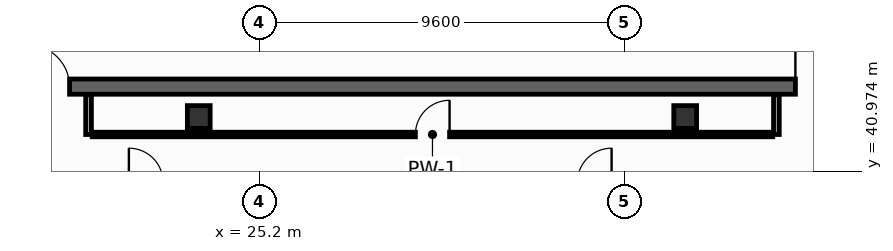
"""IFC4 building model, lengths in metres.
Left out: names, types, materials, properties, quantities, classifications, styles, units other than length and angle.
Written with IfcOpenShell. Run it as: python <this file> out.ifc"""

import sys

from ifc_helpers import new_model, si_unit, direction, frame, frame_2d, origin, origin_2d, place, context, subcontext, project, spatial, rectangle, hollow_rectangle, extrude, element, fill, save


model = new_model("IFC4")
c1 = context("Model", 3, precision=1e-05, world=origin(), true_north=direction((0.0, 1.0)))
c2 = subcontext(c1, "Body", "Model", "MODEL_VIEW")
j1 = project(units=[si_unit("LENGTHUNIT", "METRE"), si_unit("PLANEANGLEUNIT", "RADIAN")], contexts=[c1])
p1 = place(None, origin())
s1 = spatial("IfcSite", under=j1, at=p1, CompositionType="ELEMENT")
p2 = place(p1, origin())
s2 = spatial("IfcBuilding", under=s1, at=p2, CompositionType="ELEMENT")
p3 = place(p2, frame((0.0, 0.0, 302.8)))
s3 = spatial("IfcBuildingStorey", under=s2, at=p3, CompositionType="ELEMENT", Elevation=302.8)
p4 = place(p3, frame((13.7, 43.2, 0.0), z_axis=(0.0, 0.0, 1.0), x_axis=(1.0, 0.0, 0.0)))
e1 = element("IfcWall", 1, at=p4, inside=s3, PredefinedType="SHEAR", context=c2, shape_type="SweptSolid", body=[
    extrude(rectangle(XDim=32.5, YDim=0.4, at=frame_2d((16.25, 0.0))), origin(), (0.0, 0.0, 1.0), 3.55),
])
p5 = place(p4, frame((5.4, 0.0, 0.0)))
e2 = element("IfcOpeningElement", 2, at=p5, cuts=e1, PredefinedType="OPENING", context=c2, shape_type="SweptSolid", body=[
    extrude(rectangle(XDim=1.1, YDim=2.15, at=frame_2d((0.55, 1.075))), frame((0.0, 0.21, 0.0), z_axis=(0.0, -1.0, 0.0), x_axis=(1.0, 0.0, 0.0)), (0.0, 0.0, 1.0), 0.42),
])
p6 = place(p4, frame((25.6, 0.0, 0.0)))
e3 = element("IfcOpeningElement", 3, at=p6, cuts=e1, PredefinedType="OPENING", context=c2, shape_type="SweptSolid", body=[
    extrude(rectangle(XDim=1.1, YDim=2.15, at=frame_2d((0.55, 1.075))), frame((0.0, 0.21, 0.0), z_axis=(0.0, -1.0, 0.0), x_axis=(1.0, 0.0, 0.0)), (0.0, 0.0, 1.0), 0.42),
])
for number, where, z_axis, x_axis in (
    (4, (23.6, 42.4, 0.0), (0.0, 0.0, 1.0), (1.0, 0.0, 0.0)),
    (5, (36.4, 42.4, 0.0), (0.0, 0.0, 1.0), (1.0, 0.0, 0.0)),
):
    element("IfcColumn", number, at=place(p3, frame(where, z_axis=z_axis, x_axis=x_axis)), inside=s3, PredefinedType="COLUMN", context=c2, shape_type="SweptSolid", body=[
        extrude(hollow_rectangle(XDim=0.6, YDim=0.6, WallThickness=0.028, at=origin_2d()), origin(), (0.0, 0.0, 1.0), 3.8),
    ])
for number, where, z_axis, x_axis in (
    (6, (20.7, 41.94, 0.0), (0.0, 0.0, 1.0), (0.0, 1.0, 0.0)),
    (7, (38.8, 41.94, 0.0), (0.0, 0.0, 1.0), (0.0, 1.0, 0.0)),
):
    element("IfcWall", number, at=place(p3, frame(where, z_axis=z_axis, x_axis=x_axis)), inside=s3, PredefinedType="PARTITIONING", context=c2, shape_type="SweptSolid", body=[
        extrude(rectangle(XDim=1.04, YDim=0.15, at=frame_2d((0.52, 0.0))), origin(), (0.0, 0.0, 1.0), 3.55),
    ])
p7 = place(p3, frame((20.795, 41.94, 0.0), z_axis=(0.0, 0.0, 1.0), x_axis=(1.0, 0.0, 0.0)))
e8 = element("IfcWall", 8, at=p7, inside=s3, PredefinedType="PARTITIONING", context=c2, shape_type="SweptSolid", body=[
    extrude(rectangle(XDim=17.91, YDim=0.12, at=frame_2d((8.955, 0.0))), origin(), (0.0, 0.0, 1.0), 3.047),
])
p8 = place(p7, frame((8.505, 0.0, 0.0)))
e9 = element("IfcOpeningElement", 9, at=p8, cuts=e8, PredefinedType="OPENING", context=c2, shape_type="SweptSolid", body=[
    extrude(rectangle(XDim=0.9, YDim=2.1, at=frame_2d((0.45, 1.05))), frame((0.0, 0.07, 0.0), z_axis=(0.0, -1.0, 0.0), x_axis=(1.0, 0.0, 0.0)), (0.0, 0.0, 1.0), 0.14),
])
p9 = place(p5, origin())
e10 = element("IfcDoor", 10, at=p9, inside=s3, OperationType="SINGLE_SWING_LEFT", PredefinedType="DOOR", context=c2, shape_type="SweptSolid", body=[
    extrude(rectangle(XDim=1.1, YDim=2.15, at=frame_2d((0.55, 1.075))), frame((0.0, 0.025, 0.0), z_axis=(0.0, -1.0, 0.0), x_axis=(1.0, 0.0, 0.0)), (0.0, 0.0, 1.0), 0.05),
])
fill(e2, e10)
p10 = place(p6, origin())
e11 = element("IfcDoor", 11, at=p10, inside=s3, OperationType="SINGLE_SWING_LEFT", PredefinedType="DOOR", context=c2, shape_type="SweptSolid", body=[
    extrude(rectangle(XDim=1.1, YDim=2.15, at=frame_2d((0.55, 1.075))), frame((0.0, 0.025, 0.0), z_axis=(0.0, -1.0, 0.0), x_axis=(1.0, 0.0, 0.0)), (0.0, 0.0, 1.0), 0.05),
])
fill(e3, e11)
p11 = place(p8, origin())
e12 = element("IfcDoor", 12, at=p11, inside=s3, OperationType="SINGLE_SWING_RIGHT", PredefinedType="DOOR", context=c2, shape_type="SweptSolid", body=[
    extrude(rectangle(XDim=0.9, YDim=2.1, at=frame_2d((0.45, 1.05))), frame((0.0, 0.025, 0.0), z_axis=(0.0, -1.0, 0.0), x_axis=(1.0, 0.0, 0.0)), (0.0, 0.0, 1.0), 0.05),
])
fill(e9, e12)
save(model, sys.argv[1])
